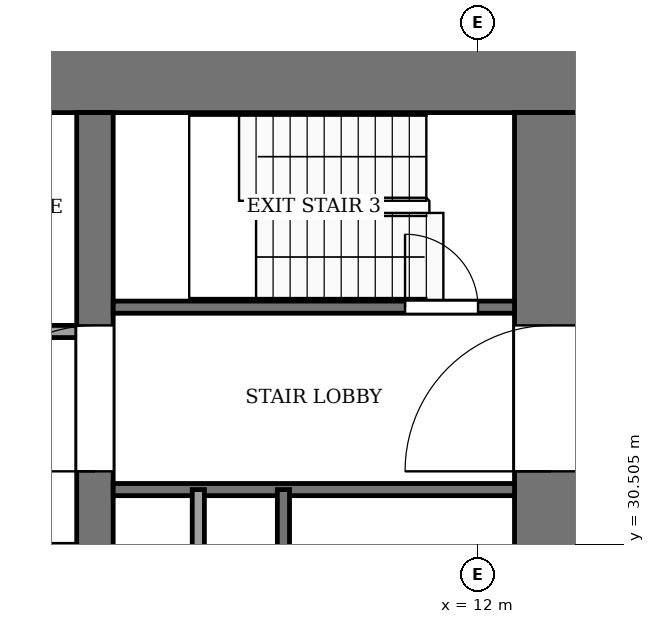
"""IFC4 building model, lengths in metres.
Left out: names, types, materials, properties, quantities, classifications, styles, units other than length and angle.
Written with IfcOpenShell. Run it as: python <this file> out.ifc"""

import sys

from ifc_helpers import new_model, si_unit, direction, frame, frame_2d, origin, place, context, subcontext, project, spatial, rectangle, extrude, element, fill, save


model = new_model("IFC4")
c1 = context("Model", 3, precision=1e-05, world=origin(), true_north=direction((0.0, 1.0)))
c2 = subcontext(c1, "Body", "Model", "MODEL_VIEW")
j1 = project(units=[si_unit("LENGTHUNIT", "METRE"), si_unit("PLANEANGLEUNIT", "RADIAN")], contexts=[c1])
p1 = place(None, origin())
s1 = spatial("IfcSite", under=j1, at=p1, CompositionType="ELEMENT")
p2 = place(p1, origin())
s2 = spatial("IfcBuilding", under=s1, at=p2, CompositionType="ELEMENT")
p3 = place(p2, frame((0.0, 0.0, 74.0)))
s3 = spatial("IfcBuildingStorey", under=s2, at=p3, CompositionType="ELEMENT", Elevation=74.0)
p4 = place(p3, frame((-13.8, 38.2, -0.13), z_axis=(0.0, 0.0, 1.0), x_axis=(1.0, 0.0, 0.0)))
e1 = element("IfcWall", 1, at=p4, inside=s3, PredefinedType="SHEAR", context=c2, shape_type="SweptSolid", body=[
    extrude(rectangle(XDim=27.6, YDim=1.2, at=frame_2d((13.8, 0.0))), origin(), (0.0, 0.0, 1.0), 4.0),
])
p5 = place(p3, frame((13.2, 18.4, -0.13), z_axis=(0.0, 0.0, 1.0), x_axis=(0.0, 1.0, 0.0)))
e2 = element("IfcWall", 2, at=p5, inside=s3, PredefinedType="SHEAR", context=c2, shape_type="SweptSolid", body=[
    extrude(rectangle(XDim=19.2, YDim=1.2, at=frame_2d((9.6, 0.0))), origin(), (0.0, 0.0, 1.0), 4.0),
])
p6 = place(p5, frame((2.8, 0.0, 0.13)))
e3 = element("IfcOpeningElement", 3, at=p6, cuts=e2, PredefinedType="OPENING", context=c2, shape_type="SweptSolid", body=[
    extrude(rectangle(XDim=2.4, YDim=2.4, at=frame_2d((1.2, 1.2))), frame((0.0, 0.61, 0.0), z_axis=(0.0, -1.0, 0.0), x_axis=(1.0, 0.0, 0.0)), (0.0, 0.0, 1.0), 1.22),
])
p7 = place(p5, frame((13.3, 0.0, 0.13)))
e4 = element("IfcOpeningElement", 4, at=p7, cuts=e2, PredefinedType="OPENING", context=c2, shape_type="SweptSolid", body=[
    extrude(rectangle(XDim=2.4, YDim=2.4, at=frame_2d((1.2, 1.2))), frame((0.0, 0.61, 0.0), z_axis=(0.0, -1.0, 0.0), x_axis=(1.0, 0.0, 0.0)), (0.0, 0.0, 1.0), 1.22),
])
p8 = place(p3, frame((5.7, 18.4, -0.13), z_axis=(0.0, 0.0, 1.0), x_axis=(0.0, 1.0, 0.0)))
e5 = element("IfcWall", 5, at=p8, inside=s3, PredefinedType="SHEAR", context=c2, shape_type="SweptSolid", body=[
    extrude(rectangle(XDim=19.2, YDim=0.6, at=frame_2d((9.6, 0.0))), origin(), (0.0, 0.0, 1.0), 4.0),
])
p9 = place(p8, frame((8.35, 0.0, 0.13)))
e6 = element("IfcOpeningElement", 6, at=p9, cuts=e5, PredefinedType="OPENING", context=c2, shape_type="SweptSolid", body=[
    extrude(rectangle(XDim=0.9, YDim=2.1, at=frame_2d((0.45, 1.05))), frame((0.0, 0.31, 0.0), z_axis=(0.0, -1.0, 0.0), x_axis=(1.0, 0.0, 0.0)), (0.0, 0.0, 1.0), 0.62),
])
p10 = place(p8, frame((13.3, 0.0, 0.13)))
e7 = element("IfcOpeningElement", 7, at=p10, cuts=e5, PredefinedType="OPENING", context=c2, shape_type="SweptSolid", body=[
    extrude(rectangle(XDim=2.4, YDim=2.4, at=frame_2d((1.2, 1.2))), frame((0.0, 0.31, 0.0), z_axis=(0.0, -1.0, 0.0), x_axis=(1.0, 0.0, 0.0)), (0.0, 0.0, 1.0), 0.62),
])
p11 = place(p3, frame((6.0, 31.4, 0.0), z_axis=(0.0, 0.0, 1.0), x_axis=(1.0, 0.0, 0.0)))
e8 = element("IfcWall", 8, at=p11, inside=s3, PredefinedType="PARTITIONING", context=c2, shape_type="SweptSolid", body=[
    extrude(rectangle(XDim=6.6, YDim=0.2, at=frame_2d((3.3, 0.0))), origin(), (0.0, 0.0, 1.0), 3.87),
])
p12 = place(p3, frame((-5.4, 34.0, 0.0), z_axis=(0.0, 0.0, 1.0), x_axis=(1.0, 0.0, 0.0)))
e9 = element("IfcWall", 9, at=p12, inside=s3, PredefinedType="PARTITIONING", context=c2, shape_type="SweptSolid", body=[
    extrude(rectangle(XDim=10.8, YDim=0.2, at=frame_2d((5.4, 0.0))), origin(), (0.0, 0.0, 1.0), 3.87),
])
p13 = place(p12, frame((6.15, 0.0, 0.0)))
e10 = element("IfcOpeningElement", 10, at=p13, cuts=e9, PredefinedType="OPENING", context=c2, shape_type="SweptSolid", body=[
    extrude(rectangle(XDim=1.2, YDim=2.2, at=frame_2d((0.6, 1.1))), frame((0.0, 0.11, 0.0), z_axis=(0.0, -1.0, 0.0), x_axis=(1.0, 0.0, 0.0)), (0.0, 0.0, 1.0), 0.22),
])
p14 = place(p12, frame((8.95, 0.0, 0.0)))
e11 = element("IfcOpeningElement", 11, at=p14, cuts=e9, PredefinedType="OPENING", context=c2, shape_type="SweptSolid", body=[
    extrude(rectangle(XDim=1.0, YDim=2.1, at=frame_2d((0.5, 1.05))), frame((0.0, 0.11, 0.0), z_axis=(0.0, -1.0, 0.0), x_axis=(1.0, 0.0, 0.0)), (0.0, 0.0, 1.0), 0.22),
])
p15 = place(p3, frame((6.0, 34.4, 0.0), z_axis=(0.0, 0.0, 1.0), x_axis=(1.0, 0.0, 0.0)))
e12 = element("IfcWall", 12, at=p15, inside=s3, PredefinedType="PARTITIONING", context=c2, shape_type="SweptSolid", body=[
    extrude(rectangle(XDim=6.6, YDim=0.2, at=frame_2d((3.3, 0.0))), origin(), (0.0, 0.0, 1.0), 3.87),
])
p16 = place(p15, frame((4.8, 0.0, 0.0)))
e13 = element("IfcOpeningElement", 13, at=p16, cuts=e12, PredefinedType="OPENING", context=c2, shape_type="SweptSolid", body=[
    extrude(rectangle(XDim=1.2, YDim=2.2, at=frame_2d((0.6, 1.1))), frame((0.0, 0.11, 0.0), z_axis=(0.0, -1.0, 0.0), x_axis=(1.0, 0.0, 0.0)), (0.0, 0.0, 1.0), 0.22),
])
for number, where, z_axis, x_axis in (
    (14, (7.4, 24.0, 0.0), (0.0, 0.0, 1.0), (0.0, 1.0, 0.0)),
    (15, (8.8, 24.0, 0.0), (0.0, 0.0, 1.0), (0.0, 1.0, 0.0)),
):
    element("IfcWall", number, at=place(p3, frame(where, z_axis=z_axis, x_axis=x_axis)), inside=s3, PredefinedType="PARTITIONING", context=c2, shape_type="SweptSolid", body=[
        extrude(rectangle(XDim=7.4, YDim=0.2, at=frame_2d((3.7, 0.0))), origin(), (0.0, 0.0, 1.0), 3.87),
    ])
p17 = place(p16, origin())
e16 = element("IfcDoor", 16, at=p17, inside=s3, OperationType="SINGLE_SWING_RIGHT", PredefinedType="DOOR", context=c2, shape_type="SweptSolid", body=[
    extrude(rectangle(XDim=1.2, YDim=2.2, at=frame_2d((0.6, 1.1))), frame((0.0, 0.025, 0.0), z_axis=(0.0, -1.0, 0.0), x_axis=(1.0, 0.0, 0.0)), (0.0, 0.0, 1.0), 0.05),
])
fill(e13, e16)
p18 = place(p10, origin())
e17 = element("IfcDoor", 17, at=p18, inside=s3, OperationType="DOUBLE_DOOR_SINGLE_SWING", PredefinedType="DOOR", context=c2, shape_type="SweptSolid", body=[
    extrude(rectangle(XDim=2.4, YDim=2.4, at=frame_2d((1.2, 1.2))), frame((0.0, 0.025, 0.0), z_axis=(0.0, -1.0, 0.0), x_axis=(1.0, 0.0, 0.0)), (0.0, 0.0, 1.0), 0.05),
])
fill(e7, e17)
p19 = place(p7, origin())
e18 = element("IfcDoor", 18, at=p19, inside=s3, OperationType="DOUBLE_DOOR_SINGLE_SWING", PredefinedType="DOOR", context=c2, shape_type="SweptSolid", body=[
    extrude(rectangle(XDim=2.4, YDim=2.4, at=frame_2d((1.2, 1.2))), frame((0.0, 0.025, 0.0), z_axis=(0.0, -1.0, 0.0), x_axis=(1.0, 0.0, 0.0)), (0.0, 0.0, 1.0), 0.05),
])
fill(e4, e18)
save(model, sys.argv[1])
